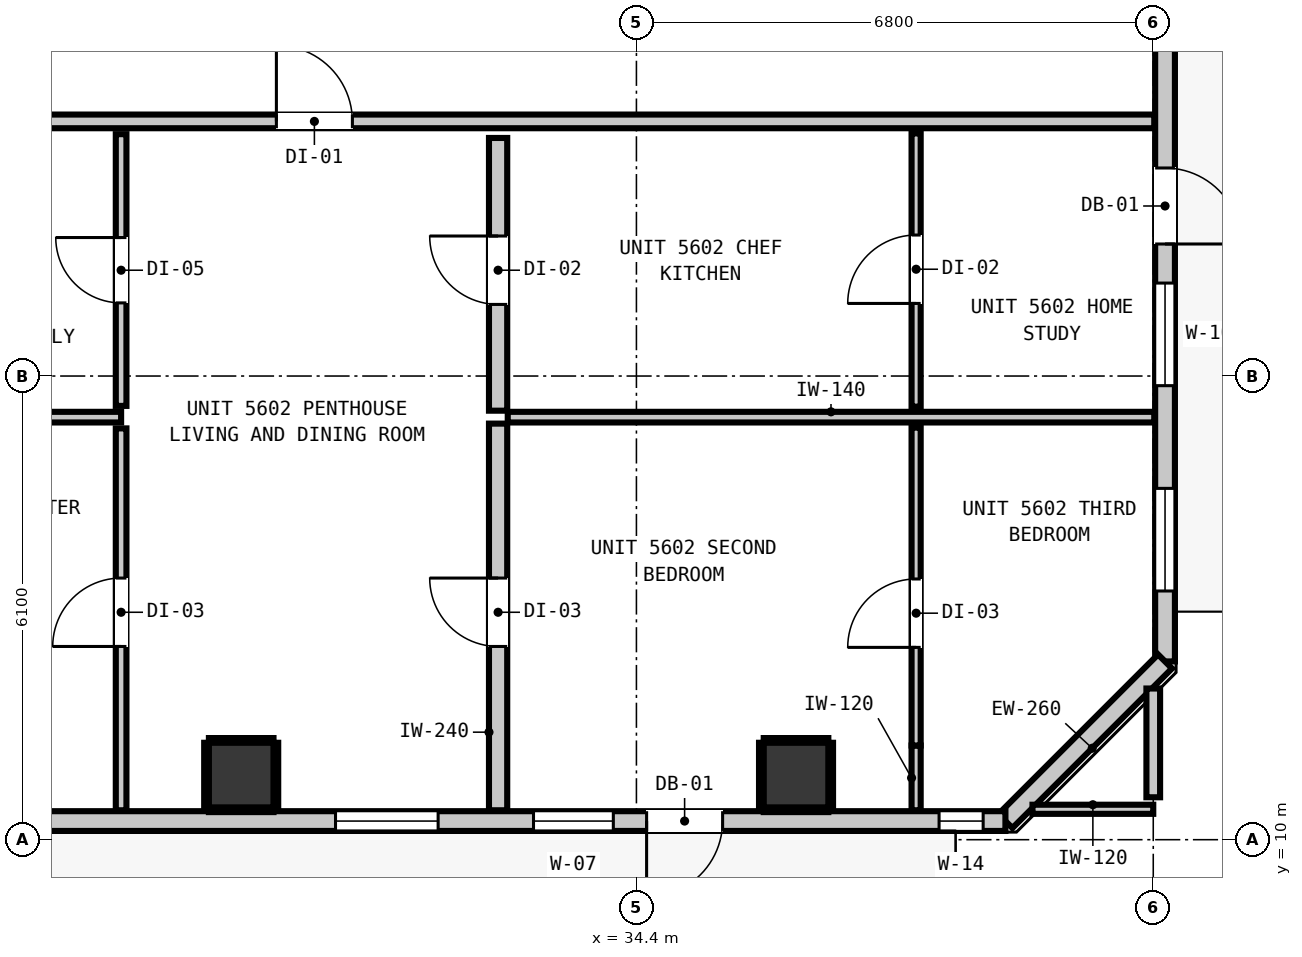
"""IFC4 building model, lengths in metres.
Left out: names, types, materials, properties, quantities, classifications, styles, units other than length and angle.
Written with IfcOpenShell. Run it as: python <this file> out.ifc"""

import sys

from ifc_helpers import new_model, si_unit, direction, frame, frame_2d, origin, origin_2d, place, context, subcontext, project, spatial, rectangle, extrude, element, fill, save


model = new_model("IFC4")
c1 = context("Model", 3, precision=1e-05, world=origin(), true_north=direction((0.0, 1.0)))
c2 = subcontext(c1, "Body", "Model", "MODEL_VIEW")
j1 = project(units=[si_unit("LENGTHUNIT", "METRE"), si_unit("PLANEANGLEUNIT", "RADIAN")], contexts=[c1])
p1 = place(None, origin())
s1 = spatial("IfcSite", under=j1, at=p1, CompositionType="ELEMENT")
p2 = place(p1, origin())
s2 = spatial("IfcBuilding", under=s1, at=p2, CompositionType="ELEMENT")
p3 = place(p2, frame((0.0, 0.0, 193.48)))
s3 = spatial("IfcBuildingStorey", under=s2, at=p3, CompositionType="ELEMENT", Elevation=193.48)
for number, where, z_axis, x_axis in (
    (1, (29.2, 10.85, 0.0), (0.0, 0.0, 1.0), (1.0, 0.0, 0.0)),
    (2, (36.5, 10.85, 0.0), (0.0, 0.0, 1.0), (1.0, 0.0, 0.0)),
):
    element("IfcColumn", number, at=place(p3, frame(where, z_axis=z_axis, x_axis=x_axis)), inside=s3, PredefinedType="COLUMN", context=c2, shape_type="SweptSolid", body=[
        extrude(rectangle(XDim=0.85, YDim=0.85, at=origin_2d()), origin(), (0.0, 0.0, 1.0), 3.32),
    ])
p4 = place(p3, frame((41.355, 42.655, 0.0), z_axis=(0.0, 0.0, 1.0), x_axis=(0.0, -1.0, 0.0)))
e3 = element("IfcWall", 3, at=p4, inside=s3, PredefinedType="STANDARD", context=c2, shape_type="SweptSolid", body=[
    extrude(rectangle(XDim=30.31, YDim=0.26, at=frame_2d((15.155, 0.0))), origin(), (0.0, 0.0, 1.0), 3.1),
])
p5 = place(p4, frame((23.818, 0.0, 0.0)))
e4 = element("IfcOpeningElement", 4, at=p5, cuts=e3, PredefinedType="OPENING", context=c2, shape_type="SweptSolid", body=[
    extrude(rectangle(XDim=1.0, YDim=2.15, at=frame_2d((0.5, 1.075))), frame((0.0, 0.14, 0.0), z_axis=(0.0, -1.0, 0.0), x_axis=(1.0, 0.0, 0.0)), (0.0, 0.0, 1.0), 0.28),
])
p6 = place(p4, frame((25.332, 0.0, 0.85)))
e5 = element("IfcOpeningElement", 5, at=p6, cuts=e3, PredefinedType="OPENING", context=c2, shape_type="SweptSolid", body=[
    extrude(rectangle(XDim=1.35, YDim=1.85, at=frame_2d((0.675, 0.925))), frame((0.0, 0.14, 0.0), z_axis=(0.0, -1.0, 0.0), x_axis=(1.0, 0.0, 0.0)), (0.0, 0.0, 1.0), 0.28),
])
p7 = place(p4, frame((28.033, 0.0, 0.85)))
e6 = element("IfcOpeningElement", 6, at=p7, cuts=e3, PredefinedType="OPENING", context=c2, shape_type="SweptSolid", body=[
    extrude(rectangle(XDim=1.35, YDim=1.85, at=frame_2d((0.675, 0.925))), frame((0.0, 0.14, 0.0), z_axis=(0.0, -1.0, 0.0), x_axis=(1.0, 0.0, 0.0)), (0.0, 0.0, 1.0), 0.28),
])
p8 = place(p3, frame((41.355, 12.345, 0.0), z_axis=(0.0, 0.0, 1.0), x_axis=(-0.707147883682, -0.707065676302, 0.0)))
e7 = element("IfcWall", 7, at=p8, inside=s3, PredefinedType="STANDARD", context=c2, shape_type="SweptSolid", body=[
    extrude(rectangle(XDim=2.97, YDim=0.26, at=frame_2d((1.485, 0.0))), origin(), (0.0, 0.0, 1.0), 3.1),
])
p9 = place(p3, frame((39.255, 10.245, 0.0), z_axis=(0.0, 0.0, 1.0), x_axis=(-1.0, 0.0, 0.0)))
e8 = element("IfcWall", 8, at=p9, inside=s3, PredefinedType="STANDARD", context=c2, shape_type="SweptSolid", body=[
    extrude(rectangle(XDim=32.71, YDim=0.26, at=frame_2d((16.355, 0.0))), origin(), (0.0, 0.0, 1.0), 3.1),
])
p10 = place(p9, frame((3.721, 0.0, 0.0)))
e9 = element("IfcOpeningElement", 9, at=p10, cuts=e8, PredefinedType="OPENING", context=c2, shape_type="SweptSolid", body=[
    extrude(rectangle(XDim=1.0, YDim=2.15, at=frame_2d((0.5, 1.075))), frame((0.0, 0.14, 0.0), z_axis=(0.0, -1.0, 0.0), x_axis=(1.0, 0.0, 0.0)), (0.0, 0.0, 1.0), 0.28),
])
p11 = place(p9, frame((22.64, 0.0, 0.85)))
e10 = element("IfcOpeningElement", 10, at=p11, cuts=e8, PredefinedType="OPENING", context=c2, shape_type="SweptSolid", body=[
    extrude(rectangle(XDim=1.35, YDim=1.85, at=frame_2d((0.675, 0.925))), frame((0.0, 0.14, 0.0), z_axis=(0.0, -1.0, 0.0), x_axis=(1.0, 0.0, 0.0)), (0.0, 0.0, 1.0), 0.28),
])
p12 = place(p9, frame((30.118, 0.0, 0.85)))
e11 = element("IfcOpeningElement", 11, at=p12, cuts=e8, PredefinedType="OPENING", context=c2, shape_type="SweptSolid", body=[
    extrude(rectangle(XDim=1.35, YDim=1.85, at=frame_2d((0.675, 0.925))), frame((0.0, 0.14, 0.0), z_axis=(0.0, -1.0, 0.0), x_axis=(1.0, 0.0, 0.0)), (0.0, 0.0, 1.0), 0.28),
])
p13 = place(p9, frame((15.896, 0.0, 0.85)))
e12 = element("IfcOpeningElement", 12, at=p13, cuts=e8, PredefinedType="OPENING", context=c2, shape_type="SweptSolid", body=[
    extrude(rectangle(XDim=1.35, YDim=1.85, at=frame_2d((0.675, 0.925))), frame((0.0, 0.14, 0.0), z_axis=(0.0, -1.0, 0.0), x_axis=(1.0, 0.0, 0.0)), (0.0, 0.0, 1.0), 0.28),
])
p14 = place(p9, frame((7.464, 0.0, 0.85)))
e13 = element("IfcOpeningElement", 13, at=p14, cuts=e8, PredefinedType="OPENING", context=c2, shape_type="SweptSolid", body=[
    extrude(rectangle(XDim=1.35, YDim=1.85, at=frame_2d((0.675, 0.925))), frame((0.0, 0.14, 0.0), z_axis=(0.0, -1.0, 0.0), x_axis=(1.0, 0.0, 0.0)), (0.0, 0.0, 1.0), 0.28),
])
p15 = place(p9, frame((12.648, 0.0, 0.85)))
e14 = element("IfcOpeningElement", 14, at=p15, cuts=e8, PredefinedType="OPENING", context=c2, shape_type="SweptSolid", body=[
    extrude(rectangle(XDim=1.35, YDim=1.85, at=frame_2d((0.675, 0.925))), frame((0.0, 0.14, 0.0), z_axis=(0.0, -1.0, 0.0), x_axis=(1.0, 0.0, 0.0)), (0.0, 0.0, 1.0), 0.28),
])
p16 = place(p9, frame((5.159, 0.0, 0.85)))
e15 = element("IfcOpeningElement", 15, at=p16, cuts=e8, PredefinedType="OPENING", context=c2, shape_type="SweptSolid", body=[
    extrude(rectangle(XDim=1.05, YDim=1.65, at=frame_2d((0.525, 0.825))), frame((0.0, 0.14, 0.0), z_axis=(0.0, -1.0, 0.0), x_axis=(1.0, 0.0, 0.0)), (0.0, 0.0, 1.0), 0.28),
])
p17 = place(p9, frame((0.293, 0.0, 0.85)))
e16 = element("IfcOpeningElement", 16, at=p17, cuts=e8, PredefinedType="OPENING", context=c2, shape_type="SweptSolid", body=[
    extrude(rectangle(XDim=0.58, YDim=1.5, at=frame_2d((0.29, 0.75))), frame((0.0, 0.14, 0.0), z_axis=(0.0, -1.0, 0.0), x_axis=(1.0, 0.0, 0.0)), (0.0, 0.0, 1.0), 0.28),
])
p18 = place(p3, frame((4.587, 19.45, 0.0), z_axis=(0.0, 0.0, 1.0), x_axis=(1.0, 0.0, 0.0)))
e17 = element("IfcWall", 17, at=p18, inside=s3, PredefinedType="PARTITIONING", context=c2, shape_type="SweptSolid", body=[
    extrude(rectangle(XDim=36.626, YDim=0.18, at=frame_2d((18.313, 0.0))), origin(), (0.0, 0.0, 1.0), 3.1),
])
p19 = place(p18, frame((9.184, 0.0, 0.0)))
e18 = element("IfcOpeningElement", 18, at=p19, cuts=e17, PredefinedType="OPENING", context=c2, shape_type="SweptSolid", body=[
    extrude(rectangle(XDim=1.0, YDim=2.15, at=frame_2d((0.5, 1.075))), frame((0.0, 0.1, 0.0), z_axis=(0.0, -1.0, 0.0), x_axis=(1.0, 0.0, 0.0)), (0.0, 0.0, 1.0), 0.2),
])
p20 = place(p18, frame((25.076, 0.0, 0.0)))
e19 = element("IfcOpeningElement", 19, at=p20, cuts=e17, PredefinedType="OPENING", context=c2, shape_type="SweptSolid", body=[
    extrude(rectangle(XDim=1.0, YDim=2.15, at=frame_2d((0.5, 1.075))), frame((0.0, 0.1, 0.0), z_axis=(0.0, -1.0, 0.0), x_axis=(1.0, 0.0, 0.0)), (0.0, 0.0, 1.0), 0.2),
])
p21 = place(p3, frame((18.154, 15.559, 0.0), z_axis=(0.0, 0.0, 1.0), x_axis=(1.0, 0.0, 0.0)))
e20 = element("IfcWall", 20, at=p21, inside=s3, PredefinedType="PARTITIONING", context=c2, shape_type="SweptSolid", body=[
    extrude(rectangle(XDim=9.466, YDim=0.14, at=frame_2d((4.733, 0.0))), origin(), (0.0, 0.0, 1.0), 3.1),
])
p22 = place(p3, frame((32.707, 15.559, 0.0), z_axis=(0.0, 0.0, 1.0), x_axis=(1.0, 0.0, 0.0)))
e21 = element("IfcWall", 21, at=p22, inside=s3, PredefinedType="PARTITIONING", context=c2, shape_type="SweptSolid", body=[
    extrude(rectangle(XDim=8.506, YDim=0.14, at=frame_2d((4.253, 0.0))), origin(), (0.0, 0.0, 1.0), 3.1),
])
p23 = place(p3, frame((39.611, 10.4, 0.0), z_axis=(0.0, 0.0, 1.0), x_axis=(1.0, 0.0, 0.0)))
e22 = element("IfcWall", 22, at=p23, inside=s3, PredefinedType="PARTITIONING", context=c2, shape_type="SweptSolid", body=[
    extrude(rectangle(XDim=1.589, YDim=0.12, at=frame_2d((0.794, 0.0))), origin(), (0.0, 0.0, 1.0), 3.1),
])
p24 = place(p3, frame((32.58, 10.387, 0.0), z_axis=(0.0, 0.0, 1.0), x_axis=(0.0, 1.0, 0.0)))
e23 = element("IfcWall", 23, at=p24, inside=s3, PredefinedType="PARTITIONING", context=c2, shape_type="SweptSolid", body=[
    extrude(rectangle(XDim=5.087, YDim=0.24, at=frame_2d((2.543, 0.0))), origin(), (0.0, 0.0, 1.0), 3.1),
])
p25 = place(p24, frame((2.155, 0.0, 0.0)))
e24 = element("IfcOpeningElement", 24, at=p25, cuts=e23, PredefinedType="OPENING", context=c2, shape_type="SweptSolid", body=[
    extrude(rectangle(XDim=0.9, YDim=2.1, at=frame_2d((0.45, 1.05))), frame((0.0, 0.13, 0.0), z_axis=(0.0, -1.0, 0.0), x_axis=(1.0, 0.0, 0.0)), (0.0, 0.0, 1.0), 0.26),
])
p26 = place(p3, frame((32.58, 15.644, 0.0), z_axis=(0.0, 0.0, 1.0), x_axis=(0.0, 1.0, 0.0)))
e25 = element("IfcWall", 25, at=p26, inside=s3, PredefinedType="PARTITIONING", context=c2, shape_type="SweptSolid", body=[
    extrude(rectangle(XDim=3.588, YDim=0.24, at=frame_2d((1.794, 0.0))), origin(), (0.0, 0.0, 1.0), 3.1),
])
p27 = place(p26, frame((1.398, 0.0, 0.0)))
e26 = element("IfcOpeningElement", 26, at=p27, cuts=e25, PredefinedType="OPENING", context=c2, shape_type="SweptSolid", body=[
    extrude(rectangle(XDim=0.9, YDim=2.1, at=frame_2d((0.45, 1.05))), frame((0.0, 0.13, 0.0), z_axis=(0.0, -1.0, 0.0), x_axis=(1.0, 0.0, 0.0)), (0.0, 0.0, 1.0), 0.26),
])
p28 = place(p3, frame((41.2, 10.558, 0.0), z_axis=(0.0, 0.0, 1.0), x_axis=(0.0, 1.0, 0.0)))
e27 = element("IfcWall", 27, at=p28, inside=s3, PredefinedType="PARTITIONING", context=c2, shape_type="SweptSolid", body=[
    extrude(rectangle(XDim=1.431, YDim=0.18, at=frame_2d((0.715, 0.0))), origin(), (0.0, 0.0, 1.0), 3.1),
])
p29 = place(p3, frame((27.62, 10.387, 0.0), z_axis=(0.0, 0.0, 1.0), x_axis=(0.0, 1.0, 0.0)))
e28 = element("IfcWall", 28, at=p29, inside=s3, PredefinedType="PARTITIONING", context=c2, shape_type="SweptSolid", body=[
    extrude(rectangle(XDim=5.024, YDim=0.14, at=frame_2d((2.512, 0.0))), origin(), (0.0, 0.0, 1.0), 3.1),
])
p30 = place(p29, frame((2.155, 0.0, 0.0)))
e29 = element("IfcOpeningElement", 29, at=p30, cuts=e28, PredefinedType="OPENING", context=c2, shape_type="SweptSolid", body=[
    extrude(rectangle(XDim=0.9, YDim=2.1, at=frame_2d((0.45, 1.05))), frame((0.0, 0.08, 0.0), z_axis=(0.0, -1.0, 0.0), x_axis=(1.0, 0.0, 0.0)), (0.0, 0.0, 1.0), 0.16),
])
p31 = place(p3, frame((27.62, 15.707, 0.0), z_axis=(0.0, 0.0, 1.0), x_axis=(0.0, 1.0, 0.0)))
e30 = element("IfcWall", 30, at=p31, inside=s3, PredefinedType="PARTITIONING", context=c2, shape_type="SweptSolid", body=[
    extrude(rectangle(XDim=3.575, YDim=0.14, at=frame_2d((1.788, 0.0))), origin(), (0.0, 0.0, 1.0), 3.1),
])
p32 = place(p31, frame((1.355, 0.0, 0.0)))
e31 = element("IfcOpeningElement", 31, at=p32, cuts=e30, PredefinedType="OPENING", context=c2, shape_type="SweptSolid", body=[
    extrude(rectangle(XDim=0.86, YDim=2.02, at=frame_2d((0.43, 1.01))), frame((0.0, 0.08, 0.0), z_axis=(0.0, -1.0, 0.0), x_axis=(1.0, 0.0, 0.0)), (0.0, 0.0, 1.0), 0.16),
])
p33 = place(p3, frame((38.08, 10.387, 0.0), z_axis=(0.0, 0.0, 1.0), x_axis=(0.0, 1.0, 0.0)))
e32 = element("IfcWall", 32, at=p33, inside=s3, PredefinedType="PARTITIONING", context=c2, shape_type="SweptSolid", body=[
    extrude(rectangle(XDim=0.852, YDim=0.12, at=frame_2d((0.426, 0.0))), origin(), (0.0, 0.0, 1.0), 3.1),
])
p34 = place(p3, frame((38.08, 11.239, 0.0), z_axis=(0.0, 0.0, 1.0), x_axis=(0.0, 1.0, 0.0)))
e33 = element("IfcWall", 33, at=p34, inside=s3, PredefinedType="PARTITIONING", context=c2, shape_type="SweptSolid", body=[
    extrude(rectangle(XDim=4.182, YDim=0.12, at=frame_2d((2.091, 0.0))), origin(), (0.0, 0.0, 1.0), 2.477),
])
p35 = place(p34, frame((1.291, 0.0, 0.0)))
e34 = element("IfcOpeningElement", 34, at=p35, cuts=e33, PredefinedType="OPENING", context=c2, shape_type="SweptSolid", body=[
    extrude(rectangle(XDim=0.9, YDim=2.1, at=frame_2d((0.45, 1.05))), frame((0.0, 0.07, 0.0), z_axis=(0.0, -1.0, 0.0), x_axis=(1.0, 0.0, 0.0)), (0.0, 0.0, 1.0), 0.14),
])
p36 = place(p3, frame((38.08, 15.697, 0.0), z_axis=(0.0, 0.0, 1.0), x_axis=(0.0, 1.0, 0.0)))
e35 = element("IfcWall", 35, at=p36, inside=s3, PredefinedType="PARTITIONING", context=c2, shape_type="SweptSolid", body=[
    extrude(rectangle(XDim=3.595, YDim=0.12, at=frame_2d((1.797, 0.0))), origin(), (0.0, 0.0, 1.0), 3.1),
])
p37 = place(p36, frame((1.358, 0.0, 0.0)))
e36 = element("IfcOpeningElement", 36, at=p37, cuts=e35, PredefinedType="OPENING", context=c2, shape_type="SweptSolid", body=[
    extrude(rectangle(XDim=0.9, YDim=2.1, at=frame_2d((0.45, 1.05))), frame((0.0, 0.07, 0.0), z_axis=(0.0, -1.0, 0.0), x_axis=(1.0, 0.0, 0.0)), (0.0, 0.0, 1.0), 0.14),
])
for number, where, z_axis, x_axis in (
    (37, (28.775, 10.393, 0.0), (0.0, 0.0, 1.0), (1.0, 0.0, 0.0)),
    (38, (28.775, 11.307, 0.0), (0.0, 0.0, 1.0), (1.0, 0.0, 0.0)),
):
    element("IfcWall", number, at=place(p3, frame(where, z_axis=z_axis, x_axis=x_axis)), inside=s3, PredefinedType="PARTITIONING", context=c2, shape_type="SweptSolid", body=[
        extrude(rectangle(XDim=0.85, YDim=0.06, at=frame_2d((0.425, 0.0))), origin(), (0.0, 0.0, 1.0), 1.45),
    ])
for number, where, z_axis, x_axis in (
    (39, (28.743, 10.425, 0.0), (0.0, 0.0, 1.0), (0.0, 1.0, 0.0)),
    (40, (29.657, 10.425, 0.0), (0.0, 0.0, 1.0), (0.0, 1.0, 0.0)),
):
    element("IfcWall", number, at=place(p3, frame(where, z_axis=z_axis, x_axis=x_axis)), inside=s3, PredefinedType="PARTITIONING", context=c2, shape_type="SweptSolid", body=[
        extrude(rectangle(XDim=0.85, YDim=0.06, at=frame_2d((0.425, 0.0))), origin(), (0.0, 0.0, 1.0), 1.45),
    ])
for number, where, z_axis, x_axis in (
    (41, (36.075, 10.393, 0.0), (0.0, 0.0, 1.0), (1.0, 0.0, 0.0)),
    (42, (36.075, 11.307, 0.0), (0.0, 0.0, 1.0), (1.0, 0.0, 0.0)),
):
    element("IfcWall", number, at=place(p3, frame(where, z_axis=z_axis, x_axis=x_axis)), inside=s3, PredefinedType="PARTITIONING", context=c2, shape_type="SweptSolid", body=[
        extrude(rectangle(XDim=0.85, YDim=0.06, at=frame_2d((0.425, 0.0))), origin(), (0.0, 0.0, 1.0), 1.45),
    ])
for number, where, z_axis, x_axis in (
    (43, (36.043, 10.425, 0.0), (0.0, 0.0, 1.0), (0.0, 1.0, 0.0)),
    (44, (36.957, 10.425, 0.0), (0.0, 0.0, 1.0), (0.0, 1.0, 0.0)),
):
    element("IfcWall", number, at=place(p3, frame(where, z_axis=z_axis, x_axis=x_axis)), inside=s3, PredefinedType="PARTITIONING", context=c2, shape_type="SweptSolid", body=[
        extrude(rectangle(XDim=0.85, YDim=0.06, at=frame_2d((0.425, 0.0))), origin(), (0.0, 0.0, 1.0), 1.45),
    ])
p38 = place(p10, origin())
e45 = element("IfcDoor", 45, at=p38, inside=s3, OperationType="SINGLE_SWING_RIGHT", PredefinedType="DOOR", context=c2, shape_type="SweptSolid", body=[
    extrude(rectangle(XDim=1.0, YDim=2.15, at=frame_2d((0.5, 1.075))), frame((0.0, 0.025, 0.0), z_axis=(0.0, -1.0, 0.0), x_axis=(1.0, 0.0, 0.0)), (0.0, 0.0, 1.0), 0.05),
])
fill(e9, e45)
p39 = place(p5, origin())
e46 = element("IfcDoor", 46, at=p39, inside=s3, OperationType="SINGLE_SWING_RIGHT", PredefinedType="DOOR", context=c2, shape_type="SweptSolid", body=[
    extrude(rectangle(XDim=1.0, YDim=2.15, at=frame_2d((0.5, 1.075))), frame((0.0, 0.025, 0.0), z_axis=(0.0, -1.0, 0.0), x_axis=(1.0, 0.0, 0.0)), (0.0, 0.0, 1.0), 0.05),
])
fill(e4, e46)
p40 = place(p6, origin())
e47 = element("IfcWindow", 47, at=p40, inside=s3, PartitioningType="SINGLE_PANEL", PredefinedType="WINDOW", context=c2, shape_type="SweptSolid", body=[
    extrude(rectangle(XDim=1.35, YDim=1.85, at=frame_2d((0.675, 0.925))), frame((0.0, 0.03, 0.0), z_axis=(0.0, -1.0, 0.0), x_axis=(1.0, 0.0, 0.0)), (0.0, 0.0, 1.0), 0.06),
])
fill(e5, e47)
p41 = place(p7, origin())
e48 = element("IfcWindow", 48, at=p41, inside=s3, PartitioningType="SINGLE_PANEL", PredefinedType="WINDOW", context=c2, shape_type="SweptSolid", body=[
    extrude(rectangle(XDim=1.35, YDim=1.85, at=frame_2d((0.675, 0.925))), frame((0.0, 0.03, 0.0), z_axis=(0.0, -1.0, 0.0), x_axis=(1.0, 0.0, 0.0)), (0.0, 0.0, 1.0), 0.06),
])
fill(e6, e48)
p42 = place(p14, origin())
e49 = element("IfcWindow", 49, at=p42, inside=s3, PartitioningType="SINGLE_PANEL", PredefinedType="WINDOW", context=c2, shape_type="SweptSolid", body=[
    extrude(rectangle(XDim=1.35, YDim=1.85, at=frame_2d((0.675, 0.925))), frame((0.0, 0.03, 0.0), z_axis=(0.0, -1.0, 0.0), x_axis=(1.0, 0.0, 0.0)), (0.0, 0.0, 1.0), 0.06),
])
fill(e13, e49)
p43 = place(p16, origin())
e50 = element("IfcWindow", 50, at=p43, inside=s3, PartitioningType="SINGLE_PANEL", PredefinedType="WINDOW", context=c2, shape_type="SweptSolid", body=[
    extrude(rectangle(XDim=1.05, YDim=1.65, at=frame_2d((0.525, 0.825))), frame((0.0, 0.03, 0.0), z_axis=(0.0, -1.0, 0.0), x_axis=(1.0, 0.0, 0.0)), (0.0, 0.0, 1.0), 0.06),
])
fill(e15, e50)
p44 = place(p17, origin())
e51 = element("IfcWindow", 51, at=p44, inside=s3, PartitioningType="SINGLE_PANEL", PredefinedType="WINDOW", context=c2, shape_type="SweptSolid", body=[
    extrude(rectangle(XDim=0.58, YDim=1.5, at=frame_2d((0.29, 0.75))), frame((0.0, 0.03, 0.0), z_axis=(0.0, -1.0, 0.0), x_axis=(1.0, 0.0, 0.0)), (0.0, 0.0, 1.0), 0.06),
])
fill(e16, e51)
p45 = place(p20, origin())
e52 = element("IfcDoor", 52, at=p45, inside=s3, OperationType="SINGLE_SWING_LEFT", PredefinedType="DOOR", context=c2, shape_type="SweptSolid", body=[
    extrude(rectangle(XDim=1.0, YDim=2.15, at=frame_2d((0.5, 1.075))), frame((0.0, 0.025, 0.0), z_axis=(0.0, -1.0, 0.0), x_axis=(1.0, 0.0, 0.0)), (0.0, 0.0, 1.0), 0.05),
])
fill(e19, e52)
p46 = place(p32, origin())
e53 = element("IfcDoor", 53, at=p46, inside=s3, OperationType="SINGLE_SWING_RIGHT", PredefinedType="DOOR", context=c2, shape_type="SweptSolid", body=[
    extrude(rectangle(XDim=0.86, YDim=2.02, at=frame_2d((0.43, 1.01))), frame((0.0, 0.025, 0.0), z_axis=(0.0, -1.0, 0.0), x_axis=(1.0, 0.0, 0.0)), (0.0, 0.0, 1.0), 0.05),
])
fill(e31, e53)
p47 = place(p30, origin())
e54 = element("IfcDoor", 54, at=p47, inside=s3, OperationType="SINGLE_SWING_LEFT", PredefinedType="DOOR", context=c2, shape_type="SweptSolid", body=[
    extrude(rectangle(XDim=0.9, YDim=2.1, at=frame_2d((0.45, 1.05))), frame((0.0, 0.025, 0.0), z_axis=(0.0, -1.0, 0.0), x_axis=(1.0, 0.0, 0.0)), (0.0, 0.0, 1.0), 0.05),
])
fill(e29, e54)
p48 = place(p27, origin())
e55 = element("IfcDoor", 55, at=p48, inside=s3, OperationType="SINGLE_SWING_RIGHT", PredefinedType="DOOR", context=c2, shape_type="SweptSolid", body=[
    extrude(rectangle(XDim=0.9, YDim=2.1, at=frame_2d((0.45, 1.05))), frame((0.0, 0.025, 0.0), z_axis=(0.0, -1.0, 0.0), x_axis=(1.0, 0.0, 0.0)), (0.0, 0.0, 1.0), 0.05),
])
fill(e26, e55)
p49 = place(p37, origin())
e56 = element("IfcDoor", 56, at=p49, inside=s3, OperationType="SINGLE_SWING_LEFT", PredefinedType="DOOR", context=c2, shape_type="SweptSolid", body=[
    extrude(rectangle(XDim=0.9, YDim=2.1, at=frame_2d((0.45, 1.05))), frame((0.0, 0.025, 0.0), z_axis=(0.0, -1.0, 0.0), x_axis=(1.0, 0.0, 0.0)), (0.0, 0.0, 1.0), 0.05),
])
fill(e36, e56)
p50 = place(p25, origin())
e57 = element("IfcDoor", 57, at=p50, inside=s3, OperationType="SINGLE_SWING_RIGHT", PredefinedType="DOOR", context=c2, shape_type="SweptSolid", body=[
    extrude(rectangle(XDim=0.9, YDim=2.1, at=frame_2d((0.45, 1.05))), frame((0.0, 0.025, 0.0), z_axis=(0.0, -1.0, 0.0), x_axis=(1.0, 0.0, 0.0)), (0.0, 0.0, 1.0), 0.05),
])
fill(e24, e57)
p51 = place(p35, origin())
e58 = element("IfcDoor", 58, at=p51, inside=s3, OperationType="SINGLE_SWING_LEFT", PredefinedType="DOOR", context=c2, shape_type="SweptSolid", body=[
    extrude(rectangle(XDim=0.9, YDim=2.1, at=frame_2d((0.45, 1.05))), frame((0.0, 0.025, 0.0), z_axis=(0.0, -1.0, 0.0), x_axis=(1.0, 0.0, 0.0)), (0.0, 0.0, 1.0), 0.05),
])
fill(e34, e58)
save(model, sys.argv[1])
